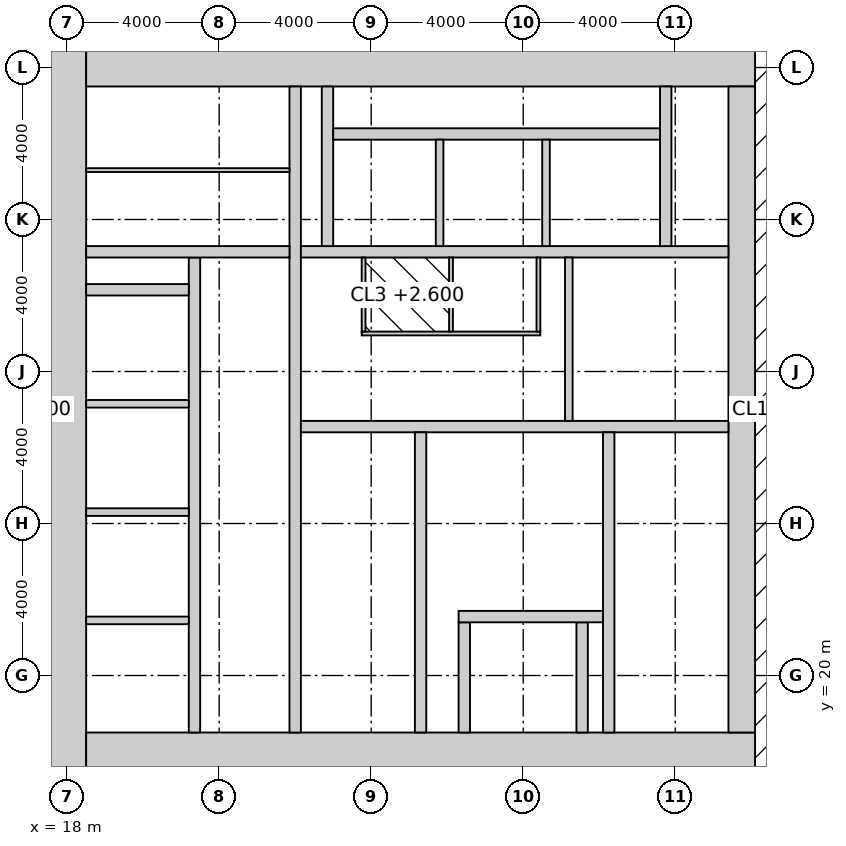
"""IFC4 building model, lengths in metres.
Left out: names, types, materials, properties, quantities, classifications, styles, units other than length and angle.
Written with IfcOpenShell. Run it as: python <this file> out.ifc"""

import sys

from ifc_helpers import new_model, si_unit, direction, frame, frame_2d, origin, place, context, subcontext, project, spatial, rectangle, extrude, element, fill, save


model = new_model("IFC4")
c1 = context("Model", 3, precision=1e-05, world=origin(), true_north=direction((0.0, 1.0)))
c2 = subcontext(c1, "Body", "Model", "MODEL_VIEW")
j1 = project(units=[si_unit("LENGTHUNIT", "METRE"), si_unit("PLANEANGLEUNIT", "RADIAN")], contexts=[c1])
p1 = place(None, origin())
s1 = spatial("IfcSite", under=j1, at=p1, CompositionType="ELEMENT")
p2 = place(p1, origin())
s2 = spatial("IfcBuilding", under=s1, at=p2, CompositionType="ELEMENT")
p3 = place(p2, frame((0.0, 0.0, 93.4)))
s3 = spatial("IfcBuildingStorey", under=s2, at=p3, CompositionType="ELEMENT", Elevation=93.4)
p4 = place(p3, frame((18.0, 17.5, -0.15), z_axis=(0.0, 0.0, 1.0), x_axis=(0.0, 1.0, 0.0)))
e1 = element("IfcWall", 1, at=p4, inside=s3, PredefinedType="SHEAR", context=c2, shape_type="SweptSolid", body=[
    extrude(rectangle(XDim=19.0, YDim=1.0, at=frame_2d((9.5, 0.0))), origin(), (0.0, 0.0, 1.0), 4.0),
])
p5 = place(p3, frame((18.5, 18.0, -0.15), z_axis=(0.0, 0.0, 1.0), x_axis=(1.0, 0.0, 0.0)))
e2 = element("IfcWall", 2, at=p5, inside=s3, PredefinedType="SHEAR", context=c2, shape_type="SweptSolid", body=[
    extrude(rectangle(XDim=17.6, YDim=1.0, at=frame_2d((8.8, 0.0))), origin(), (0.0, 0.0, 1.0), 4.0),
])
p6 = place(p5, frame((3.45, 0.0, 0.15)))
e3 = element("IfcOpeningElement", 3, at=p6, cuts=e2, PredefinedType="OPENING", context=c2, shape_type="SweptSolid", body=[
    extrude(rectangle(XDim=1.5, YDim=2.4, at=frame_2d((0.75, 1.2))), frame((0.0, 0.51, 0.0), z_axis=(0.0, -1.0, 0.0), x_axis=(1.0, 0.0, 0.0)), (0.0, 0.0, 1.0), 1.02),
])
p7 = place(p3, frame((18.5, 36.0, -0.15), z_axis=(0.0, 0.0, 1.0), x_axis=(1.0, 0.0, 0.0)))
e4 = element("IfcWall", 4, at=p7, inside=s3, PredefinedType="SHEAR", context=c2, shape_type="SweptSolid", body=[
    extrude(rectangle(XDim=17.6, YDim=1.0, at=frame_2d((8.8, 0.0))), origin(), (0.0, 0.0, 1.0), 4.0),
])
p8 = place(p3, frame((35.75, 18.5, -0.15), z_axis=(0.0, 0.0, 1.0), x_axis=(0.0, 1.0, 0.0)))
e5 = element("IfcWall", 5, at=p8, inside=s3, PredefinedType="SHEAR", context=c2, shape_type="SweptSolid", body=[
    extrude(rectangle(XDim=17.0, YDim=0.7, at=frame_2d((8.5, 0.0))), origin(), (0.0, 0.0, 1.0), 4.0),
])
p9 = place(p8, frame((9.85, 0.0, 0.15)))
e6 = element("IfcOpeningElement", 6, at=p9, cuts=e5, PredefinedType="OPENING", context=c2, shape_type="SweptSolid", body=[
    extrude(rectangle(XDim=1.0, YDim=2.2, at=frame_2d((0.5, 1.1))), frame((0.0, 0.36, 0.0), z_axis=(0.0, -1.0, 0.0), x_axis=(1.0, 0.0, 0.0)), (0.0, 0.0, 1.0), 0.72),
])
p10 = place(p3, frame((24.0, 18.5, -0.15), z_axis=(0.0, 0.0, 1.0), x_axis=(0.0, 1.0, 0.0)))
e7 = element("IfcWall", 7, at=p10, inside=s3, PredefinedType="SHEAR", context=c2, shape_type="SweptSolid", body=[
    extrude(rectangle(XDim=17.0, YDim=0.3, at=frame_2d((8.5, 0.0))), origin(), (0.0, 0.0, 1.0), 4.0),
])
p11 = place(p10, frame((9.6, 0.0, 0.15)))
e8 = element("IfcOpeningElement", 8, at=p11, cuts=e7, PredefinedType="OPENING", context=c2, shape_type="SweptSolid", body=[
    extrude(rectangle(XDim=1.5, YDim=2.4, at=frame_2d((0.75, 1.2))), frame((0.0, 0.16, 0.0), z_axis=(0.0, -1.0, 0.0), x_axis=(1.0, 0.0, 0.0)), (0.0, 0.0, 1.0), 0.32),
])
p12 = place(p3, frame((24.15, 26.55, -0.15), z_axis=(0.0, 0.0, 1.0), x_axis=(1.0, 0.0, 0.0)))
e9 = element("IfcWall", 9, at=p12, inside=s3, PredefinedType="SHEAR", context=c2, shape_type="SweptSolid", body=[
    extrude(rectangle(XDim=11.25, YDim=0.3, at=frame_2d((5.625, 0.0))), origin(), (0.0, 0.0, 1.0), 4.0),
])
p13 = place(p12, frame((9.25, 0.0, 0.15)))
e10 = element("IfcOpeningElement", 10, at=p13, cuts=e9, PredefinedType="OPENING", context=c2, shape_type="SweptSolid", body=[
    extrude(rectangle(XDim=1.0, YDim=2.2, at=frame_2d((0.5, 1.1))), frame((0.0, 0.16, 0.0), z_axis=(0.0, -1.0, 0.0), x_axis=(1.0, 0.0, 0.0)), (0.0, 0.0, 1.0), 0.32),
])
p14 = place(p12, frame((4.9, 0.0, 0.15)))
e11 = element("IfcOpeningElement", 11, at=p14, cuts=e9, PredefinedType="OPENING", context=c2, shape_type="SweptSolid", body=[
    extrude(rectangle(XDim=1.5, YDim=2.4, at=frame_2d((0.75, 1.2))), frame((0.0, 0.16, 0.0), z_axis=(0.0, -1.0, 0.0), x_axis=(1.0, 0.0, 0.0)), (0.0, 0.0, 1.0), 0.32),
])
p15 = place(p3, frame((27.3, 18.5, -0.15), z_axis=(0.0, 0.0, 1.0), x_axis=(0.0, 1.0, 0.0)))
e12 = element("IfcWall", 12, at=p15, inside=s3, PredefinedType="SHEAR", context=c2, shape_type="SweptSolid", body=[
    extrude(rectangle(XDim=7.9, YDim=0.3, at=frame_2d((3.95, 0.0))), origin(), (0.0, 0.0, 1.0), 4.0),
])
p16 = place(p15, frame((6.4, 0.0, 0.15)))
e13 = element("IfcOpeningElement", 13, at=p16, cuts=e12, PredefinedType="OPENING", context=c2, shape_type="SweptSolid", body=[
    extrude(rectangle(XDim=1.0, YDim=2.2, at=frame_2d((0.5, 1.1))), frame((0.0, 0.16, 0.0), z_axis=(0.0, -1.0, 0.0), x_axis=(1.0, 0.0, 0.0)), (0.0, 0.0, 1.0), 0.32),
])
p17 = place(p3, frame((32.25, 18.5, -0.15), z_axis=(0.0, 0.0, 1.0), x_axis=(0.0, 1.0, 0.0)))
e14 = element("IfcWall", 14, at=p17, inside=s3, PredefinedType="SHEAR", context=c2, shape_type="SweptSolid", body=[
    extrude(rectangle(XDim=7.9, YDim=0.3, at=frame_2d((3.95, 0.0))), origin(), (0.0, 0.0, 1.0), 4.0),
])
for number, where, z_axis, x_axis in (
    (15, (28.45, 18.5, -0.15), (0.0, 0.0, 1.0), (0.0, 1.0, 0.0)),
    (16, (31.55, 18.5, -0.15), (0.0, 0.0, 1.0), (0.0, 1.0, 0.0)),
):
    element("IfcWall", number, at=place(p3, frame(where, z_axis=z_axis, x_axis=x_axis)), inside=s3, PredefinedType="SHEAR", context=c2, shape_type="SweptSolid", body=[
        extrude(rectangle(XDim=2.9, YDim=0.3, at=frame_2d((1.45, 0.0))), origin(), (0.0, 0.0, 1.0), 4.0),
    ])
p18 = place(p3, frame((28.3, 21.55, -0.15), z_axis=(0.0, 0.0, 1.0), x_axis=(1.0, 0.0, 0.0)))
e17 = element("IfcWall", 17, at=p18, inside=s3, PredefinedType="SHEAR", context=c2, shape_type="SweptSolid", body=[
    extrude(rectangle(XDim=3.8, YDim=0.3, at=frame_2d((1.9, 0.0))), origin(), (0.0, 0.0, 1.0), 4.0),
])
p19 = place(p18, frame((1.05, 0.0, 0.15)))
e18 = element("IfcOpeningElement", 18, at=p19, cuts=e17, PredefinedType="OPENING", context=c2, shape_type="SweptSolid", body=[
    extrude(rectangle(XDim=1.3, YDim=2.4, at=frame_2d((0.65, 1.2))), frame((0.0, 0.16, 0.0), z_axis=(0.0, -1.0, 0.0), x_axis=(1.0, 0.0, 0.0)), (0.0, 0.0, 1.0), 0.32),
])
p20 = place(p3, frame((24.15, 31.15, -0.15), z_axis=(0.0, 0.0, 1.0), x_axis=(1.0, 0.0, 0.0)))
e19 = element("IfcWall", 19, at=p20, inside=s3, PredefinedType="SHEAR", context=c2, shape_type="SweptSolid", body=[
    extrude(rectangle(XDim=11.25, YDim=0.3, at=frame_2d((5.625, 0.0))), origin(), (0.0, 0.0, 1.0), 4.0),
])
p21 = place(p20, frame((7.25, 0.0, 0.15)))
e20 = element("IfcOpeningElement", 20, at=p21, cuts=e19, PredefinedType="OPENING", context=c2, shape_type="SweptSolid", body=[
    extrude(rectangle(XDim=1.4, YDim=2.4, at=frame_2d((0.7, 1.2))), frame((0.0, 0.16, 0.0), z_axis=(0.0, -1.0, 0.0), x_axis=(1.0, 0.0, 0.0)), (0.0, 0.0, 1.0), 0.32),
])
p22 = place(p3, frame((21.35, 18.5, -0.15), z_axis=(0.0, 0.0, 1.0), x_axis=(0.0, 1.0, 0.0)))
e21 = element("IfcWall", 21, at=p22, inside=s3, PredefinedType="SHEAR", context=c2, shape_type="SweptSolid", body=[
    extrude(rectangle(XDim=12.5, YDim=0.3, at=frame_2d((6.25, 0.0))), origin(), (0.0, 0.0, 1.0), 4.0),
])
p23 = place(p22, frame((0.875, 0.0, 0.15)))
e22 = element("IfcOpeningElement", 22, at=p23, cuts=e21, PredefinedType="OPENING", context=c2, shape_type="SweptSolid", body=[
    extrude(rectangle(XDim=1.1, YDim=2.2, at=frame_2d((0.55, 1.1))), frame((0.0, 0.16, 0.0), z_axis=(0.0, -1.0, 0.0), x_axis=(1.0, 0.0, 0.0)), (0.0, 0.0, 1.0), 0.32),
])
p24 = place(p22, frame((3.825, 0.0, 0.15)))
e23 = element("IfcOpeningElement", 23, at=p24, cuts=e21, PredefinedType="OPENING", context=c2, shape_type="SweptSolid", body=[
    extrude(rectangle(XDim=1.1, YDim=2.2, at=frame_2d((0.55, 1.1))), frame((0.0, 0.16, 0.0), z_axis=(0.0, -1.0, 0.0), x_axis=(1.0, 0.0, 0.0)), (0.0, 0.0, 1.0), 0.32),
])
p25 = place(p22, frame((6.675, 0.0, 0.15)))
e24 = element("IfcOpeningElement", 24, at=p25, cuts=e21, PredefinedType="OPENING", context=c2, shape_type="SweptSolid", body=[
    extrude(rectangle(XDim=1.1, YDim=2.2, at=frame_2d((0.55, 1.1))), frame((0.0, 0.16, 0.0), z_axis=(0.0, -1.0, 0.0), x_axis=(1.0, 0.0, 0.0)), (0.0, 0.0, 1.0), 0.32),
])
p26 = place(p22, frame((9.575, 0.0, 0.15)))
e25 = element("IfcOpeningElement", 25, at=p26, cuts=e21, PredefinedType="OPENING", context=c2, shape_type="SweptSolid", body=[
    extrude(rectangle(XDim=1.1, YDim=2.2, at=frame_2d((0.55, 1.1))), frame((0.0, 0.16, 0.0), z_axis=(0.0, -1.0, 0.0), x_axis=(1.0, 0.0, 0.0)), (0.0, 0.0, 1.0), 0.32),
])
p27 = place(p3, frame((18.5, 31.15, -0.15), z_axis=(0.0, 0.0, 1.0), x_axis=(1.0, 0.0, 0.0)))
e26 = element("IfcWall", 26, at=p27, inside=s3, PredefinedType="SHEAR", context=c2, shape_type="SweptSolid", body=[
    extrude(rectangle(XDim=5.35, YDim=0.3, at=frame_2d((2.675, 0.0))), origin(), (0.0, 0.0, 1.0), 4.0),
])
p28 = place(p27, frame((3.4, 0.0, 0.15)))
e27 = element("IfcOpeningElement", 27, at=p28, cuts=e26, PredefinedType="OPENING", context=c2, shape_type="SweptSolid", body=[
    extrude(rectangle(XDim=1.0, YDim=2.2, at=frame_2d((0.5, 1.1))), frame((0.0, 0.16, 0.0), z_axis=(0.0, -1.0, 0.0), x_axis=(1.0, 0.0, 0.0)), (0.0, 0.0, 1.0), 0.32),
])
p29 = place(p3, frame((18.5, 30.15, -0.15), z_axis=(0.0, 0.0, 1.0), x_axis=(1.0, 0.0, 0.0)))
e28 = element("IfcWall", 28, at=p29, inside=s3, PredefinedType="SHEAR", context=c2, shape_type="SweptSolid", body=[
    extrude(rectangle(XDim=2.7, YDim=0.3, at=frame_2d((1.35, 0.0))), origin(), (0.0, 0.0, 1.0), 4.0),
])
for number, where, z_axis, x_axis in (
    (29, (24.85, 31.3, -0.15), (0.0, 0.0, 1.0), (0.0, 1.0, 0.0)),
    (30, (33.75, 31.3, -0.15), (0.0, 0.0, 1.0), (0.0, 1.0, 0.0)),
):
    element("IfcWall", number, at=place(p3, frame(where, z_axis=z_axis, x_axis=x_axis)), inside=s3, PredefinedType="SHEAR", context=c2, shape_type="SweptSolid", body=[
        extrude(rectangle(XDim=4.2, YDim=0.3, at=frame_2d((2.1, 0.0))), origin(), (0.0, 0.0, 1.0), 4.0),
    ])
p30 = place(p3, frame((25.0, 34.25, -0.15), z_axis=(0.0, 0.0, 1.0), x_axis=(1.0, 0.0, 0.0)))
e31 = element("IfcWall", 31, at=p30, inside=s3, PredefinedType="SHEAR", context=c2, shape_type="SweptSolid", body=[
    extrude(rectangle(XDim=8.6, YDim=0.3, at=frame_2d((4.3, 0.0))), origin(), (0.0, 0.0, 1.0), 4.0),
])
for number, where, z_axis, x_axis in (
    (32, (27.8, 31.3, -0.15), (0.0, 0.0, 1.0), (0.0, 1.0, 0.0)),
    (33, (30.6, 31.3, -0.15), (0.0, 0.0, 1.0), (0.0, 1.0, 0.0)),
):
    element("IfcWall", number, at=place(p3, frame(where, z_axis=z_axis, x_axis=x_axis)), inside=s3, PredefinedType="SOLIDWALL", context=c2, shape_type="SweptSolid", body=[
        extrude(rectangle(XDim=2.8, YDim=0.2, at=frame_2d((1.4, 0.0))), origin(), (0.0, 0.0, 1.0), 4.0),
    ])
for number, where, z_axis, x_axis in (
    (34, (18.5, 21.45, -0.15), (0.0, 0.0, 1.0), (1.0, 0.0, 0.0)),
    (35, (18.5, 24.3, -0.15), (0.0, 0.0, 1.0), (1.0, 0.0, 0.0)),
    (36, (18.5, 27.15, -0.15), (0.0, 0.0, 1.0), (1.0, 0.0, 0.0)),
):
    element("IfcWall", number, at=place(p3, frame(where, z_axis=z_axis, x_axis=x_axis)), inside=s3, PredefinedType="SOLIDWALL", context=c2, shape_type="SweptSolid", body=[
        extrude(rectangle(XDim=2.7, YDim=0.2, at=frame_2d((1.35, 0.0))), origin(), (0.0, 0.0, 1.0), 4.0),
    ])
p31 = place(p3, frame((31.2, 26.7, 0.0), z_axis=(0.0, 0.0, 1.0), x_axis=(0.0, 1.0, 0.0)))
e37 = element("IfcWall", 37, at=p31, inside=s3, PredefinedType="SOLIDWALL", context=c2, shape_type="SweptSolid", body=[
    extrude(rectangle(XDim=4.3, YDim=0.2, at=frame_2d((2.15, 0.0))), origin(), (0.0, 0.0, 1.0), 3.85),
])
p32 = place(p3, frame((18.5, 33.3, 0.0), z_axis=(0.0, 0.0, 1.0), x_axis=(1.0, 0.0, 0.0)))
e38 = element("IfcWall", 38, at=p32, inside=s3, PredefinedType="PARTITIONING", context=c2, shape_type="SweptSolid", body=[
    extrude(rectangle(XDim=5.35, YDim=0.1, at=frame_2d((2.675, 0.0))), origin(), (0.0, 0.0, 1.0), 3.85),
])
p33 = place(p32, frame((1.2, 0.0, 0.0)))
e39 = element("IfcOpeningElement", 39, at=p33, cuts=e38, PredefinedType="OPENING", context=c2, shape_type="SweptSolid", body=[
    extrude(rectangle(XDim=1.0, YDim=2.2, at=frame_2d((0.5, 1.1))), frame((0.0, 0.06, 0.0), z_axis=(0.0, -1.0, 0.0), x_axis=(1.0, 0.0, 0.0)), (0.0, 0.0, 1.0), 0.12),
])
p34 = place(p3, frame((25.75, 29.0, 0.0), z_axis=(0.0, 0.0, 1.0), x_axis=(1.0, 0.0, 0.0)))
e40 = element("IfcWall", 40, at=p34, inside=s3, PredefinedType="PARTITIONING", context=c2, shape_type="SweptSolid", body=[
    extrude(rectangle(XDim=4.7, YDim=0.1, at=frame_2d((2.35, 0.0))), origin(), (0.0, 0.0, 1.0), 3.85),
])
p35 = place(p34, frame((0.7, 0.0, 0.0)))
e41 = element("IfcOpeningElement", 41, at=p35, cuts=e40, PredefinedType="OPENING", context=c2, shape_type="SweptSolid", body=[
    extrude(rectangle(XDim=1.0, YDim=2.2, at=frame_2d((0.5, 1.1))), frame((0.0, 0.06, 0.0), z_axis=(0.0, -1.0, 0.0), x_axis=(1.0, 0.0, 0.0)), (0.0, 0.0, 1.0), 0.12),
])
p36 = place(p34, frame((3.0, 0.0, 0.0)))
e42 = element("IfcOpeningElement", 42, at=p36, cuts=e40, PredefinedType="OPENING", context=c2, shape_type="SweptSolid", body=[
    extrude(rectangle(XDim=1.0, YDim=2.2, at=frame_2d((0.5, 1.1))), frame((0.0, 0.06, 0.0), z_axis=(0.0, -1.0, 0.0), x_axis=(1.0, 0.0, 0.0)), (0.0, 0.0, 1.0), 0.12),
])
for number, where, z_axis, x_axis in (
    (43, (25.8, 29.05, 0.0), (0.0, 0.0, 1.0), (0.0, 1.0, 0.0)),
    (44, (30.4, 29.05, 0.0), (0.0, 0.0, 1.0), (0.0, 1.0, 0.0)),
    (45, (28.1, 29.05, 0.0), (0.0, 0.0, 1.0), (0.0, 1.0, 0.0)),
):
    element("IfcWall", number, at=place(p3, frame(where, z_axis=z_axis, x_axis=x_axis)), inside=s3, PredefinedType="PARTITIONING", context=c2, shape_type="SweptSolid", body=[
        extrude(rectangle(XDim=1.95, YDim=0.1, at=frame_2d((0.975, 0.0))), origin(), (0.0, 0.0, 1.0), 3.85),
    ])
p37 = place(p16, origin())
e46 = element("IfcDoor", 46, at=p37, inside=s3, OperationType="SINGLE_SWING_RIGHT", PredefinedType="DOOR", context=c2, shape_type="SweptSolid", body=[
    extrude(rectangle(XDim=1.0, YDim=2.2, at=frame_2d((0.5, 1.1))), frame((0.0, 0.025, 0.0), z_axis=(0.0, -1.0, 0.0), x_axis=(1.0, 0.0, 0.0)), (0.0, 0.0, 1.0), 0.05),
])
fill(e13, e46)
p38 = place(p13, frame((1.0, 0.0, 0.0), z_axis=(0.0, 0.0, 1.0), x_axis=(-1.0, 0.0, 0.0)))
e47 = element("IfcDoor", 47, at=p38, inside=s3, OperationType="SINGLE_SWING_RIGHT", PredefinedType="DOOR", context=c2, shape_type="SweptSolid", body=[
    extrude(rectangle(XDim=1.0, YDim=2.2, at=frame_2d((0.5, 1.1))), frame((0.0, 0.025, 0.0), z_axis=(0.0, -1.0, 0.0), x_axis=(1.0, 0.0, 0.0)), (0.0, 0.0, 1.0), 0.05),
])
fill(e10, e47)
p39 = place(p9, origin())
e48 = element("IfcDoor", 48, at=p39, inside=s3, OperationType="SINGLE_SWING_RIGHT", PredefinedType="DOOR", context=c2, shape_type="SweptSolid", body=[
    extrude(rectangle(XDim=1.0, YDim=2.2, at=frame_2d((0.5, 1.1))), frame((0.0, 0.025, 0.0), z_axis=(0.0, -1.0, 0.0), x_axis=(1.0, 0.0, 0.0)), (0.0, 0.0, 1.0), 0.05),
])
fill(e6, e48)
p40 = place(p14, origin())
e49 = element("IfcDoor", 49, at=p40, inside=s3, OperationType="DOUBLE_DOOR_DOUBLE_SWING", PredefinedType="DOOR", context=c2, shape_type="SweptSolid", body=[
    extrude(rectangle(XDim=1.5, YDim=2.4, at=frame_2d((0.75, 1.2))), frame((0.0, 0.025, 0.0), z_axis=(0.0, -1.0, 0.0), x_axis=(1.0, 0.0, 0.0)), (0.0, 0.0, 1.0), 0.05),
])
fill(e11, e49)
p41 = place(p11, origin())
e50 = element("IfcDoor", 50, at=p41, inside=s3, OperationType="DOUBLE_DOOR_DOUBLE_SWING", PredefinedType="DOOR", context=c2, shape_type="SweptSolid", body=[
    extrude(rectangle(XDim=1.5, YDim=2.4, at=frame_2d((0.75, 1.2))), frame((0.0, 0.025, 0.0), z_axis=(0.0, -1.0, 0.0), x_axis=(1.0, 0.0, 0.0)), (0.0, 0.0, 1.0), 0.05),
])
fill(e8, e50)
p42 = place(p28, origin())
e51 = element("IfcDoor", 51, at=p42, inside=s3, OperationType="SINGLE_SWING_LEFT", PredefinedType="DOOR", context=c2, shape_type="SweptSolid", body=[
    extrude(rectangle(XDim=1.0, YDim=2.2, at=frame_2d((0.5, 1.1))), frame((0.0, 0.025, 0.0), z_axis=(0.0, -1.0, 0.0), x_axis=(1.0, 0.0, 0.0)), (0.0, 0.0, 1.0), 0.05),
])
fill(e27, e51)
p43 = place(p33, origin())
e52 = element("IfcDoor", 52, at=p43, inside=s3, OperationType="SINGLE_SWING_LEFT", PredefinedType="DOOR", context=c2, shape_type="SweptSolid", body=[
    extrude(rectangle(XDim=1.0, YDim=2.2, at=frame_2d((0.5, 1.1))), frame((0.0, 0.025, 0.0), z_axis=(0.0, -1.0, 0.0), x_axis=(1.0, 0.0, 0.0)), (0.0, 0.0, 1.0), 0.05),
])
fill(e39, e52)
p44 = place(p35, origin())
e53 = element("IfcDoor", 53, at=p44, inside=s3, OperationType="SINGLE_SWING_LEFT", PredefinedType="DOOR", context=c2, shape_type="SweptSolid", body=[
    extrude(rectangle(XDim=1.0, YDim=2.2, at=frame_2d((0.5, 1.1))), frame((0.0, 0.025, 0.0), z_axis=(0.0, -1.0, 0.0), x_axis=(1.0, 0.0, 0.0)), (0.0, 0.0, 1.0), 0.05),
])
fill(e41, e53)
p45 = place(p36, origin())
e54 = element("IfcDoor", 54, at=p45, inside=s3, OperationType="SINGLE_SWING_LEFT", PredefinedType="DOOR", context=c2, shape_type="SweptSolid", body=[
    extrude(rectangle(XDim=1.0, YDim=2.2, at=frame_2d((0.5, 1.1))), frame((0.0, 0.025, 0.0), z_axis=(0.0, -1.0, 0.0), x_axis=(1.0, 0.0, 0.0)), (0.0, 0.0, 1.0), 0.05),
])
fill(e42, e54)
p46 = place(p6, origin())
e55 = element("IfcDoor", 55, at=p46, inside=s3, OperationType="DOUBLE_DOOR_DOUBLE_SWING", PredefinedType="DOOR", context=c2, shape_type="SweptSolid", body=[
    extrude(rectangle(XDim=1.5, YDim=2.4, at=frame_2d((0.75, 1.2))), frame((0.0, 0.025, 0.0), z_axis=(0.0, -1.0, 0.0), x_axis=(1.0, 0.0, 0.0)), (0.0, 0.0, 1.0), 0.05),
])
fill(e3, e55)
p47 = place(p19, origin())
e56 = element("IfcDoor", 56, at=p47, inside=s3, OperationType="DOUBLE_DOOR_SLIDING", PredefinedType="DOOR", context=c2, shape_type="SweptSolid", body=[
    extrude(rectangle(XDim=1.3, YDim=2.4, at=frame_2d((0.65, 1.2))), frame((0.0, 0.025, 0.0), z_axis=(0.0, -1.0, 0.0), x_axis=(1.0, 0.0, 0.0)), (0.0, 0.0, 1.0), 0.05),
])
fill(e18, e56)
p48 = place(p21, origin())
e57 = element("IfcDoor", 57, at=p48, inside=s3, OperationType="DOUBLE_DOOR_SLIDING", PredefinedType="DOOR", context=c2, shape_type="SweptSolid", body=[
    extrude(rectangle(XDim=1.4, YDim=2.4, at=frame_2d((0.7, 1.2))), frame((0.0, 0.025, 0.0), z_axis=(0.0, -1.0, 0.0), x_axis=(1.0, 0.0, 0.0)), (0.0, 0.0, 1.0), 0.05),
])
fill(e20, e57)
p49 = place(p23, origin())
e58 = element("IfcDoor", 58, at=p49, inside=s3, OperationType="DOUBLE_DOOR_SLIDING", PredefinedType="DOOR", context=c2, shape_type="SweptSolid", body=[
    extrude(rectangle(XDim=1.1, YDim=2.2, at=frame_2d((0.55, 1.1))), frame((0.0, 0.025, 0.0), z_axis=(0.0, -1.0, 0.0), x_axis=(1.0, 0.0, 0.0)), (0.0, 0.0, 1.0), 0.05),
])
fill(e22, e58)
p50 = place(p24, origin())
e59 = element("IfcDoor", 59, at=p50, inside=s3, OperationType="DOUBLE_DOOR_SLIDING", PredefinedType="DOOR", context=c2, shape_type="SweptSolid", body=[
    extrude(rectangle(XDim=1.1, YDim=2.2, at=frame_2d((0.55, 1.1))), frame((0.0, 0.025, 0.0), z_axis=(0.0, -1.0, 0.0), x_axis=(1.0, 0.0, 0.0)), (0.0, 0.0, 1.0), 0.05),
])
fill(e23, e59)
p51 = place(p25, origin())
e60 = element("IfcDoor", 60, at=p51, inside=s3, OperationType="DOUBLE_DOOR_SLIDING", PredefinedType="DOOR", context=c2, shape_type="SweptSolid", body=[
    extrude(rectangle(XDim=1.1, YDim=2.2, at=frame_2d((0.55, 1.1))), frame((0.0, 0.025, 0.0), z_axis=(0.0, -1.0, 0.0), x_axis=(1.0, 0.0, 0.0)), (0.0, 0.0, 1.0), 0.05),
])
fill(e24, e60)
p52 = place(p26, origin())
e61 = element("IfcDoor", 61, at=p52, inside=s3, OperationType="DOUBLE_DOOR_SLIDING", PredefinedType="DOOR", context=c2, shape_type="SweptSolid", body=[
    extrude(rectangle(XDim=1.1, YDim=2.2, at=frame_2d((0.55, 1.1))), frame((0.0, 0.025, 0.0), z_axis=(0.0, -1.0, 0.0), x_axis=(1.0, 0.0, 0.0)), (0.0, 0.0, 1.0), 0.05),
])
fill(e25, e61)
save(model, sys.argv[1])
